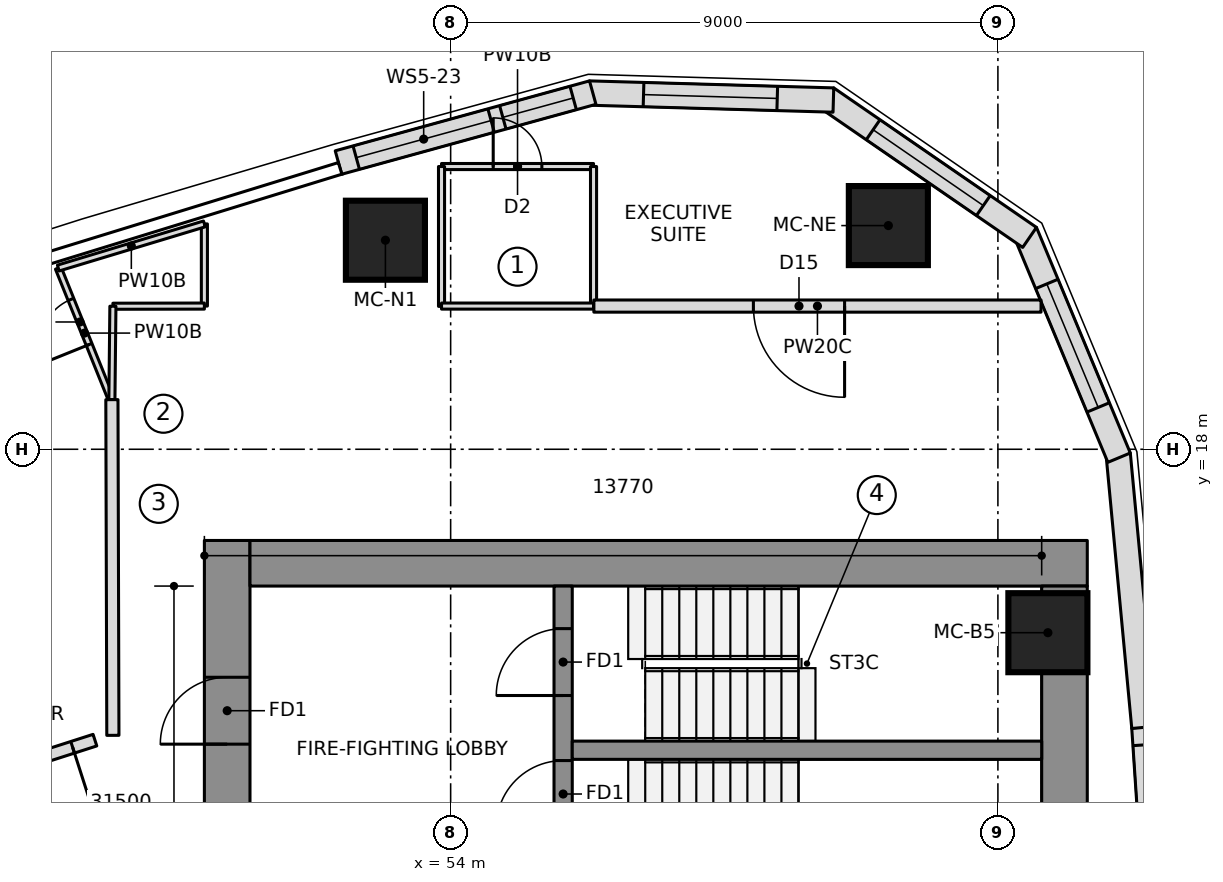
"""IFC4 building model, lengths in metres.
Left out: names, types, materials, properties, quantities, classifications, styles, units other than length and angle.
Written with IfcOpenShell. Run it as: python <this file> out.ifc"""

import sys

from ifc_helpers import new_model, si_unit, direction, frame, frame_2d, origin, origin_2d, place, context, subcontext, project, spatial, polyline, rectangle, outline, extrude, element, fill, save


model = new_model("IFC4")
c1 = context("Model", 3, precision=1e-05, world=origin(), true_north=direction((0.0, 1.0)))
c2 = subcontext(c1, "Body", "Model", "MODEL_VIEW")
j1 = project(units=[si_unit("LENGTHUNIT", "METRE"), si_unit("PLANEANGLEUNIT", "RADIAN")], contexts=[c1])
p1 = place(None, origin())
s1 = spatial("IfcSite", under=j1, at=p1, CompositionType="ELEMENT")
p2 = place(p1, origin())
s2 = spatial("IfcBuilding", under=s1, at=p2, CompositionType="ELEMENT")
p3 = place(p2, frame((0.0, 0.0, 196.8)))
s3 = spatial("IfcBuildingStorey", under=s2, at=p3, CompositionType="ELEMENT", Elevation=196.8)
p4 = place(p3, frame((50.325, 6.65, 0.0), z_axis=(0.0, 0.0, 1.0), x_axis=(0.0, 1.0, 0.0)))
e1 = element("IfcWall", 1, at=p4, inside=s3, PredefinedType="SHEAR", context=c2, shape_type="SweptSolid", body=[
    extrude(rectangle(XDim=9.85, YDim=0.75, at=frame_2d((4.925, 0.0))), origin(), (0.0, 0.0, 1.0), 3.55),
])
p5 = place(p4, frame((6.5, 0.0, 0.0)))
e2 = element("IfcOpeningElement", 2, at=p5, cuts=e1, PredefinedType="OPENING", context=c2, shape_type="SweptSolid", body=[
    extrude(rectangle(XDim=1.1, YDim=2.1, at=frame_2d((0.55, 1.05))), frame((0.0, 0.385, 0.0), z_axis=(0.0, -1.0, 0.0), x_axis=(1.0, 0.0, 0.0)), (0.0, 0.0, 1.0), 0.77),
])
p6 = place(p3, frame((50.7, 16.125, 0.0), z_axis=(0.0, 0.0, 1.0), x_axis=(1.0, 0.0, 0.0)))
e3 = element("IfcWall", 3, at=p6, inside=s3, PredefinedType="SHEAR", context=c2, shape_type="SweptSolid", body=[
    extrude(rectangle(XDim=13.77, YDim=0.75, at=frame_2d((6.885, 0.0))), origin(), (0.0, 0.0, 1.0), 3.55),
])
p7 = place(p3, frame((64.095, 8.099, 0.0), z_axis=(0.0, 0.0, 1.0), x_axis=(0.0, 1.0, 0.0)))
e4 = element("IfcWall", 4, at=p7, inside=s3, PredefinedType="SHEAR", context=c2, shape_type="SweptSolid", body=[
    extrude(rectangle(XDim=7.651, YDim=0.75, at=frame_2d((3.825, 0.0))), origin(), (0.0, 0.0, 1.0), 3.55),
])
p8 = place(p3, frame((55.85, 10.35, 0.0), z_axis=(0.0, 0.0, 1.0), x_axis=(0.0, 1.0, 0.0)))
e5 = element("IfcWall", 5, at=p8, inside=s3, PredefinedType="SHEAR", context=c2, shape_type="SweptSolid", body=[
    extrude(rectangle(XDim=5.4, YDim=0.3, at=frame_2d((2.7, 0.0))), origin(), (0.0, 0.0, 1.0), 3.55),
])
p9 = place(p8, frame((1.43, 0.0, 0.0)))
e6 = element("IfcOpeningElement", 6, at=p9, cuts=e5, PredefinedType="OPENING", context=c2, shape_type="SweptSolid", body=[
    extrude(rectangle(XDim=1.1, YDim=2.1, at=frame_2d((0.55, 1.05))), frame((0.0, 0.16, 0.0), z_axis=(0.0, -1.0, 0.0), x_axis=(1.0, 0.0, 0.0)), (0.0, 0.0, 1.0), 0.32),
])
p10 = place(p8, frame((3.6, 0.0, 0.0)))
e7 = element("IfcOpeningElement", 7, at=p10, cuts=e5, PredefinedType="OPENING", context=c2, shape_type="SweptSolid", body=[
    extrude(rectangle(XDim=1.1, YDim=2.1, at=frame_2d((0.55, 1.05))), frame((0.0, 0.16, 0.0), z_axis=(0.0, -1.0, 0.0), x_axis=(1.0, 0.0, 0.0)), (0.0, 0.0, 1.0), 0.32),
])
p11 = place(p3, frame((56.0, 13.05, 0.0), z_axis=(0.0, 0.0, 1.0), x_axis=(1.0, 0.0, 0.0)))
e8 = element("IfcWall", 8, at=p11, inside=s3, PredefinedType="SHEAR", context=c2, shape_type="SweptSolid", body=[
    extrude(rectangle(XDim=7.72, YDim=0.3, at=frame_2d((3.86, 0.0))), origin(), (0.0, 0.0, 1.0), 3.55),
])
for number, where, z_axis, x_axis in (
    (9, (63.822, 14.983, 0.0), (0.0, 0.0, 1.0), (1.0, 0.0, 0.0)),
    (10, (61.198, 21.679, 0.0), (0.0, 0.0, 1.0), (1.0, 0.0, 0.0)),
    (11, (52.927, 21.438, 0.0), (0.0, 0.0, 1.0), (1.0, 0.0, 0.0)),
):
    element("IfcColumn", number, at=place(p3, frame(where, z_axis=z_axis, x_axis=x_axis)), inside=s3, PredefinedType="COLUMN", context=c2, shape_type="SweptSolid", body=[
        extrude(rectangle(XDim=1.3, YDim=1.3, at=origin_2d()), origin(), (0.0, 0.0, 1.0), 3.55),
    ])
p12 = place(p3, frame((65.7, 8.958, 0.0), z_axis=(0.0, 0.0, 1.0), x_axis=(-0.066905935948, 0.997759287471, 0.0)))
e12 = element("IfcWall", 12, at=p12, inside=s3, PredefinedType="NOTDEFINED", context=c2, shape_type="SweptSolid", body=[
    extrude(outline(polyline([(-0.003, -0.2), (4.484, -0.2), (4.478, 0.2), (0.003, 0.2), (-0.003, -0.2)])), origin(), (0.0, 0.0, 1.0), 3.25),
])
p13 = place(p12, frame((0.29, 0.0, 0.9)))
e13 = element("IfcOpeningElement", 13, at=p13, cuts=e12, PredefinedType="OPENING", context=c2, shape_type="SweptSolid", body=[
    extrude(rectangle(XDim=3.9, YDim=1.8, at=frame_2d((1.95, 0.9))), frame((0.0, 0.21, 0.0), z_axis=(0.0, -1.0, 0.0), x_axis=(1.0, 0.0, 0.0)), (0.0, 0.0, 1.0), 0.42),
])
p14 = place(p3, frame((65.401, 13.429, 0.0), z_axis=(0.0, 0.0, 1.0), x_axis=(-0.093605694738, 0.995609348044, 0.0)))
e14 = element("IfcWall", 14, at=p14, inside=s3, PredefinedType="NOTDEFINED", context=c2, shape_type="SweptSolid", body=[
    extrude(outline(polyline([(-0.003, -0.2), (4.511, -0.2), (4.451, 0.2), (0.003, 0.2), (-0.003, -0.2)])), origin(), (0.0, 0.0, 1.0), 3.25),
])
p15 = place(p3, frame((64.981, 17.89, 0.0), z_axis=(0.0, 0.0, 1.0), x_axis=(-0.383997619794, 0.923334082547, 0.0)))
e15 = element("IfcWall", 15, at=p15, inside=s3, PredefinedType="NOTDEFINED", context=c2, shape_type="SweptSolid", body=[
    extrude(outline(polyline([(-0.03, -0.2), (3.988, -0.2), (3.87, 0.2), (0.03, 0.2), (-0.03, -0.2)])), origin(), (0.0, 0.0, 1.0), 3.25),
])
p16 = place(p15, frame((0.865, 0.0, 0.6)))
e16 = element("IfcOpeningElement", 16, at=p16, cuts=e15, PredefinedType="OPENING", context=c2, shape_type="SweptSolid", body=[
    extrude(outline(polyline([(0.0, 1.35), (0.084, 1.771), (0.322, 2.128), (0.679, 2.366), (1.1, 2.45), (1.521, 2.366), (1.878, 2.128), (2.116, 1.771), (2.2, 1.35), (2.2, 1.1), (2.116, 0.679), (1.878, 0.322), (1.521, 0.084), (1.1, 0.0), (0.679, 0.084), (0.322, 0.322), (0.084, 0.679), (0.0, 1.1), (0.0, 1.35)])), frame((0.0, 0.21, 0.0), z_axis=(0.0, -1.0, 0.0), x_axis=(1.0, 0.0, 0.0)), (0.0, 0.0, 1.0), 0.42),
])
p17 = place(p3, frame((63.472, 21.518, 0.0), z_axis=(0.0, 0.0, 1.0), x_axis=(-0.823806162588, 0.566871596115, 0.0)))
e17 = element("IfcWall", 17, at=p17, inside=s3, PredefinedType="NOTDEFINED", context=c2, shape_type="SweptSolid", body=[
    extrude(outline(polyline([(-0.059, -0.2), (3.988, -0.2), (3.87, 0.2), (0.059, 0.2), (-0.059, -0.2)])), origin(), (0.0, 0.0, 1.0), 3.25),
])
p18 = place(p17, frame((0.865, 0.0, 0.6)))
e18 = element("IfcOpeningElement", 18, at=p18, cuts=e17, PredefinedType="OPENING", context=c2, shape_type="SweptSolid", body=[
    extrude(outline(polyline([(0.0, 1.35), (0.084, 1.771), (0.322, 2.128), (0.679, 2.366), (1.1, 2.45), (1.521, 2.366), (1.878, 2.128), (2.116, 1.771), (2.2, 1.35), (2.2, 1.1), (2.116, 0.679), (1.878, 0.322), (1.521, 0.084), (1.1, 0.0), (0.679, 0.084), (0.322, 0.322), (0.084, 0.679), (0.0, 1.1), (0.0, 1.35)])), frame((0.0, 0.21, 0.0), z_axis=(0.0, -1.0, 0.0), x_axis=(1.0, 0.0, 0.0)), (0.0, 0.0, 1.0), 0.42),
])
p19 = place(p3, frame((60.236, 23.745, 0.0), z_axis=(0.0, 0.0, 1.0), x_axis=(-0.999587920197, 0.028705222472, 0.0)))
e19 = element("IfcWall", 19, at=p19, inside=s3, PredefinedType="NOTDEFINED", context=c2, shape_type="SweptSolid", body=[
    extrude(outline(polyline([(-0.059, -0.2), (3.959, -0.2), (3.9, 0.2), (0.059, 0.2), (-0.059, -0.2)])), origin(), (0.0, 0.0, 1.0), 3.25),
])
p20 = place(p19, frame((0.865, 0.0, 0.6)))
e20 = element("IfcOpeningElement", 20, at=p20, cuts=e19, PredefinedType="OPENING", context=c2, shape_type="SweptSolid", body=[
    extrude(outline(polyline([(0.0, 1.35), (0.084, 1.771), (0.322, 2.128), (0.679, 2.366), (1.1, 2.45), (1.521, 2.366), (1.878, 2.128), (2.116, 1.771), (2.2, 1.35), (2.2, 1.1), (2.116, 0.679), (1.878, 0.322), (1.521, 0.084), (1.1, 0.0), (0.679, 0.084), (0.322, 0.322), (0.084, 0.679), (0.0, 1.1), (0.0, 1.35)])), frame((0.0, 0.21, 0.0), z_axis=(0.0, -1.0, 0.0), x_axis=(1.0, 0.0, 0.0)), (0.0, 0.0, 1.0), 0.42),
])
p21 = place(p3, frame((56.308, 23.858, 0.0), z_axis=(0.0, 0.0, 1.0), x_axis=(-0.964205755089, -0.265155165617, 0.0)))
e21 = element("IfcWall", 21, at=p21, inside=s3, PredefinedType="NOTDEFINED", context=c2, shape_type="SweptSolid", body=[
    extrude(outline(polyline([(-0.03, -0.2), (4.307, -0.2), (4.307, 0.2), (0.03, 0.2), (-0.03, -0.2)])), origin(), (0.0, 0.0, 1.0), 3.25),
])
p22 = place(p21, frame((0.303, 0.0, 0.9)))
e22 = element("IfcOpeningElement", 22, at=p22, cuts=e21, PredefinedType="OPENING", context=c2, shape_type="SweptSolid", body=[
    extrude(rectangle(XDim=1.2, YDim=1.8, at=frame_2d((0.6, 0.9))), frame((0.0, 0.21, 0.0), z_axis=(0.0, -1.0, 0.0), x_axis=(1.0, 0.0, 0.0)), (0.0, 0.0, 1.0), 0.42),
])
p23 = place(p21, frame((1.704, 0.0, 0.9)))
e23 = element("IfcOpeningElement", 23, at=p23, cuts=e21, PredefinedType="OPENING", context=c2, shape_type="SweptSolid", body=[
    extrude(rectangle(XDim=2.3, YDim=1.8, at=frame_2d((1.15, 0.9))), frame((0.0, 0.21, 0.0), z_axis=(0.0, -1.0, 0.0), x_axis=(1.0, 0.0, 0.0)), (0.0, 0.0, 1.0), 0.42),
])
p24 = place(p3, frame((53.85, 22.65, 0.0), z_axis=(0.0, 0.0, 1.0), x_axis=(1.0, 0.0, 0.0)))
e24 = element("IfcWall", 24, at=p24, inside=s3, PredefinedType="PARTITIONING", context=c2, shape_type="SweptSolid", body=[
    extrude(rectangle(XDim=2.5, YDim=0.1, at=frame_2d((1.25, 0.0))), origin(), (0.0, 0.0, 1.0), 3.25),
])
p25 = place(p24, frame((0.85, 0.0, 0.0)))
e25 = element("IfcOpeningElement", 25, at=p25, cuts=e24, PredefinedType="OPENING", context=c2, shape_type="SweptSolid", body=[
    extrude(rectangle(XDim=0.8, YDim=2.1, at=frame_2d((0.4, 1.05))), frame((0.0, 0.06, 0.0), z_axis=(0.0, -1.0, 0.0), x_axis=(1.0, 0.0, 0.0)), (0.0, 0.0, 1.0), 0.12),
])
for number, where, z_axis, x_axis in (
    (26, (56.35, 22.65, 0.0), (0.0, 0.0, 1.0), (0.0, -1.0, 0.0)),
    (27, (53.85, 20.35, 0.0), (0.0, 0.0, 1.0), (0.0, 1.0, 0.0)),
):
    element("IfcWall", number, at=place(p3, frame(where, z_axis=z_axis, x_axis=x_axis)), inside=s3, PredefinedType="PARTITIONING", context=c2, shape_type="SweptSolid", body=[
        extrude(rectangle(XDim=2.3, YDim=0.1, at=frame_2d((1.15, 0.0))), origin(), (0.0, 0.0, 1.0), 3.25),
    ])
p26 = place(p3, frame((48.409, 18.841, 0.0), z_axis=(0.0, 0.0, 1.0), x_axis=(-0.373908119057, 0.927465750582, 0.0)))
e28 = element("IfcWall", 28, at=p26, inside=s3, PredefinedType="PARTITIONING", context=c2, shape_type="SweptSolid", body=[
    extrude(rectangle(XDim=2.306, YDim=0.1, at=frame_2d((1.153, 0.0))), origin(), (0.0, 0.0, 1.0), 3.25),
])
p27 = place(p26, frame((0.95, 0.0, 0.0)))
e29 = element("IfcOpeningElement", 29, at=p27, cuts=e28, PredefinedType="OPENING", context=c2, shape_type="SweptSolid", body=[
    extrude(rectangle(XDim=0.8, YDim=2.1, at=frame_2d((0.4, 1.05))), frame((0.0, 0.06, 0.0), z_axis=(0.0, -1.0, 0.0), x_axis=(1.0, 0.0, 0.0)), (0.0, 0.0, 1.0), 0.12),
])
p28 = place(p3, frame((63.709, 20.355, 0.0), z_axis=(0.0, 0.0, 1.0), x_axis=(-1.0, 0.0, 0.0)))
e30 = element("IfcWall", 30, at=p28, inside=s3, PredefinedType="PARTITIONING", context=c2, shape_type="SweptSolid", body=[
    extrude(rectangle(XDim=7.354, YDim=0.2, at=frame_2d((3.677, 0.0))), origin(), (0.0, 0.0, 1.0), 3.25),
])
p29 = place(p28, frame((3.231, 0.0, 0.0)))
e31 = element("IfcOpeningElement", 31, at=p29, cuts=e30, PredefinedType="OPENING", context=c2, shape_type="SweptSolid", body=[
    extrude(rectangle(XDim=1.5, YDim=2.1, at=frame_2d((0.75, 1.05))), frame((0.0, 0.11, 0.0), z_axis=(0.0, -1.0, 0.0), x_axis=(1.0, 0.0, 0.0)), (0.0, 0.0, 1.0), 0.22),
])
p30 = place(p3, frame((56.35, 20.355, 0.0), z_axis=(0.0, 0.0, 1.0), x_axis=(-1.0, 0.0, 0.0)))
e32 = element("IfcWall", 32, at=p30, inside=s3, PredefinedType="PARTITIONING", context=c2, shape_type="SweptSolid", body=[
    extrude(rectangle(XDim=2.5, YDim=0.1, at=frame_2d((1.25, 0.0))), origin(), (0.0, 0.0, 1.0), 3.25),
])
p31 = place(p3, frame((49.95, 21.706, 0.0), z_axis=(0.0, 0.0, 1.0), x_axis=(0.0, -1.0, 0.0)))
e33 = element("IfcWall", 33, at=p31, inside=s3, PredefinedType="PARTITIONING", context=c2, shape_type="SweptSolid", body=[
    extrude(rectangle(XDim=1.351, YDim=0.1, at=frame_2d((0.676, 0.0))), origin(), (0.0, 0.0, 1.0), 3.25),
])
p32 = place(p3, frame((49.95, 20.355, 0.0), z_axis=(0.0, 0.0, 1.0), x_axis=(-0.999998406651, -0.001785131852, 0.0)))
e34 = element("IfcWall", 34, at=p32, inside=s3, PredefinedType="PARTITIONING", context=c2, shape_type="SweptSolid", body=[
    extrude(rectangle(XDim=1.504, YDim=0.1, at=frame_2d((0.752, 0.0))), origin(), (0.0, 0.0, 1.0), 3.25),
])
p33 = place(p3, frame((48.446, 20.352, 0.0), z_axis=(0.0, 0.0, 1.0), x_axis=(-0.010805026288, -0.999941624, 0.0)))
e35 = element("IfcWall", 35, at=p33, inside=s3, PredefinedType="PARTITIONING", context=c2, shape_type="SweptSolid", body=[
    extrude(rectangle(XDim=1.536, YDim=0.1, at=frame_2d((0.768, 0.0))), origin(), (0.0, 0.0, 1.0), 3.25),
])
p34 = place(p3, frame((47.547, 20.98, 0.0), z_axis=(0.0, 0.0, 1.0), x_axis=(0.957251518155, 0.289256859885, 0.0)))
e36 = element("IfcWall", 36, at=p34, inside=s3, PredefinedType="PARTITIONING", context=c2, shape_type="SweptSolid", body=[
    extrude(rectangle(XDim=2.51, YDim=0.1, at=frame_2d((1.255, 0.0))), origin(), (0.0, 0.0, 1.0), 3.25),
])
p35 = place(p3, frame((48.15, 13.216, 0.0), z_axis=(0.0, 0.0, 1.0), x_axis=(-0.952101841283, -0.305781104428, 0.0)))
e37 = element("IfcWall", 37, at=p35, inside=s3, PredefinedType="PARTITIONING", context=c2, shape_type="SweptSolid", body=[
    extrude(rectangle(XDim=2.079, YDim=0.2, at=frame_2d((1.04, 0.0))), origin(), (0.0, 0.0, 1.0), 3.25),
])
p36 = place(p35, frame((0.385, 0.0, 0.0)))
e38 = element("IfcOpeningElement", 38, at=p36, cuts=e37, PredefinedType="OPENING", context=c2, shape_type="SweptSolid", body=[
    extrude(rectangle(XDim=1.0, YDim=2.1, at=frame_2d((0.5, 1.05))), frame((0.0, 0.11, 0.0), z_axis=(0.0, -1.0, 0.0), x_axis=(1.0, 0.0, 0.0)), (0.0, 0.0, 1.0), 0.22),
])
p37 = place(p3, frame((48.429, 18.816, 0.0), z_axis=(0.0, 0.0, 1.0), x_axis=(0.002918533604, -0.999995741072, 0.0)))
e39 = element("IfcWall", 39, at=p37, inside=s3, PredefinedType="PARTITIONING", context=c2, shape_type="SweptSolid", body=[
    extrude(rectangle(XDim=5.521, YDim=0.2, at=frame_2d((2.76, 0.0))), origin(), (0.0, 0.0, 1.0), 3.25),
])
p38 = place(p13, origin())
e40 = element("IfcWindow", 40, at=p38, inside=s3, PartitioningType="SINGLE_PANEL", PredefinedType="WINDOW", context=c2, shape_type="SweptSolid", body=[
    extrude(rectangle(XDim=3.9, YDim=1.8, at=frame_2d((1.95, 0.9))), frame((0.0, 0.17, 0.0), z_axis=(0.0, -1.0, 0.0), x_axis=(1.0, 0.0, 0.0)), (0.0, 0.0, 1.0), 0.06),
])
fill(e13, e40)
p39 = place(p16, origin())
e41 = element("IfcWindow", 41, at=p39, inside=s3, PartitioningType="SINGLE_PANEL", PredefinedType="WINDOW", context=c2, shape_type="SweptSolid", body=[
    extrude(outline(polyline([(0.0, 1.35), (0.084, 1.771), (0.322, 2.128), (0.679, 2.366), (1.1, 2.45), (1.521, 2.366), (1.878, 2.128), (2.116, 1.771), (2.2, 1.35), (2.2, 1.1), (2.116, 0.679), (1.878, 0.322), (1.521, 0.084), (1.1, 0.0), (0.679, 0.084), (0.322, 0.322), (0.084, 0.679), (0.0, 1.1), (0.0, 1.35)])), frame((0.0, 0.17, 0.0), z_axis=(0.0, -1.0, 0.0), x_axis=(1.0, 0.0, 0.0)), (0.0, 0.0, 1.0), 0.06),
])
fill(e16, e41)
p40 = place(p18, origin())
e42 = element("IfcWindow", 42, at=p40, inside=s3, PartitioningType="SINGLE_PANEL", PredefinedType="WINDOW", context=c2, shape_type="SweptSolid", body=[
    extrude(outline(polyline([(0.0, 1.35), (0.084, 1.771), (0.322, 2.128), (0.679, 2.366), (1.1, 2.45), (1.521, 2.366), (1.878, 2.128), (2.116, 1.771), (2.2, 1.35), (2.2, 1.1), (2.116, 0.679), (1.878, 0.322), (1.521, 0.084), (1.1, 0.0), (0.679, 0.084), (0.322, 0.322), (0.084, 0.679), (0.0, 1.1), (0.0, 1.35)])), frame((0.0, 0.17, 0.0), z_axis=(0.0, -1.0, 0.0), x_axis=(1.0, 0.0, 0.0)), (0.0, 0.0, 1.0), 0.06),
])
fill(e18, e42)
p41 = place(p20, origin())
e43 = element("IfcWindow", 43, at=p41, inside=s3, PartitioningType="SINGLE_PANEL", PredefinedType="WINDOW", context=c2, shape_type="SweptSolid", body=[
    extrude(outline(polyline([(0.0, 1.35), (0.084, 1.771), (0.322, 2.128), (0.679, 2.366), (1.1, 2.45), (1.521, 2.366), (1.878, 2.128), (2.116, 1.771), (2.2, 1.35), (2.2, 1.1), (2.116, 0.679), (1.878, 0.322), (1.521, 0.084), (1.1, 0.0), (0.679, 0.084), (0.322, 0.322), (0.084, 0.679), (0.0, 1.1), (0.0, 1.35)])), frame((0.0, 0.17, 0.0), z_axis=(0.0, -1.0, 0.0), x_axis=(1.0, 0.0, 0.0)), (0.0, 0.0, 1.0), 0.06),
])
fill(e20, e43)
p42 = place(p22, origin())
e44 = element("IfcWindow", 44, at=p42, inside=s3, PartitioningType="SINGLE_PANEL", PredefinedType="WINDOW", context=c2, shape_type="SweptSolid", body=[
    extrude(rectangle(XDim=1.2, YDim=1.8, at=frame_2d((0.6, 0.9))), frame((0.0, 0.17, 0.0), z_axis=(0.0, -1.0, 0.0), x_axis=(1.0, 0.0, 0.0)), (0.0, 0.0, 1.0), 0.06),
])
fill(e22, e44)
p43 = place(p23, origin())
e45 = element("IfcWindow", 45, at=p43, inside=s3, PartitioningType="SINGLE_PANEL", PredefinedType="WINDOW", context=c2, shape_type="SweptSolid", body=[
    extrude(rectangle(XDim=2.3, YDim=1.8, at=frame_2d((1.15, 0.9))), frame((0.0, 0.17, 0.0), z_axis=(0.0, -1.0, 0.0), x_axis=(1.0, 0.0, 0.0)), (0.0, 0.0, 1.0), 0.06),
])
fill(e23, e45)
p44 = place(p25, origin())
e46 = element("IfcDoor", 46, at=p44, inside=s3, OperationType="SINGLE_SWING_LEFT", PredefinedType="DOOR", context=c2, shape_type="SweptSolid", body=[
    extrude(rectangle(XDim=0.8, YDim=2.1, at=frame_2d((0.4, 1.05))), frame((0.0, 0.025, 0.0), z_axis=(0.0, -1.0, 0.0), x_axis=(1.0, 0.0, 0.0)), (0.0, 0.0, 1.0), 0.05),
])
fill(e25, e46)
p45 = place(p27, origin())
e47 = element("IfcDoor", 47, at=p45, inside=s3, OperationType="SINGLE_SWING_LEFT", PredefinedType="DOOR", context=c2, shape_type="SweptSolid", body=[
    extrude(rectangle(XDim=0.8, YDim=2.1, at=frame_2d((0.4, 1.05))), frame((0.0, 0.025, 0.0), z_axis=(0.0, -1.0, 0.0), x_axis=(1.0, 0.0, 0.0)), (0.0, 0.0, 1.0), 0.05),
])
fill(e29, e47)
p46 = place(p36, origin())
e48 = element("IfcDoor", 48, at=p46, inside=s3, OperationType="SINGLE_SWING_RIGHT", PredefinedType="DOOR", context=c2, shape_type="SweptSolid", body=[
    extrude(rectangle(XDim=1.0, YDim=2.1, at=frame_2d((0.5, 1.05))), frame((0.0, 0.025, 0.0), z_axis=(0.0, -1.0, 0.0), x_axis=(1.0, 0.0, 0.0)), (0.0, 0.0, 1.0), 0.05),
])
fill(e38, e48)
p47 = place(p29, origin())
e49 = element("IfcDoor", 49, at=p47, inside=s3, OperationType="DOUBLE_DOOR_SINGLE_SWING", PredefinedType="DOOR", context=c2, shape_type="SweptSolid", body=[
    extrude(rectangle(XDim=1.5, YDim=2.1, at=frame_2d((0.75, 1.05))), frame((0.0, 0.025, 0.0), z_axis=(0.0, -1.0, 0.0), x_axis=(1.0, 0.0, 0.0)), (0.0, 0.0, 1.0), 0.05),
])
fill(e31, e49)
p48 = place(p9, origin())
e50 = element("IfcDoor", 50, at=p48, inside=s3, OperationType="SINGLE_SWING_RIGHT", PredefinedType="DOOR", context=c2, shape_type="SweptSolid", body=[
    extrude(rectangle(XDim=1.1, YDim=2.1, at=frame_2d((0.55, 1.05))), frame((0.0, 0.025, 0.0), z_axis=(0.0, -1.0, 0.0), x_axis=(1.0, 0.0, 0.0)), (0.0, 0.0, 1.0), 0.05),
])
fill(e6, e50)
p49 = place(p10, origin())
e51 = element("IfcDoor", 51, at=p49, inside=s3, OperationType="SINGLE_SWING_RIGHT", PredefinedType="DOOR", context=c2, shape_type="SweptSolid", body=[
    extrude(rectangle(XDim=1.1, YDim=2.1, at=frame_2d((0.55, 1.05))), frame((0.0, 0.025, 0.0), z_axis=(0.0, -1.0, 0.0), x_axis=(1.0, 0.0, 0.0)), (0.0, 0.0, 1.0), 0.05),
])
fill(e7, e51)
p50 = place(p5, origin())
e52 = element("IfcDoor", 52, at=p50, inside=s3, OperationType="SINGLE_SWING_RIGHT", PredefinedType="DOOR", context=c2, shape_type="SweptSolid", body=[
    extrude(rectangle(XDim=1.1, YDim=2.1, at=frame_2d((0.55, 1.05))), frame((0.0, 0.025, 0.0), z_axis=(0.0, -1.0, 0.0), x_axis=(1.0, 0.0, 0.0)), (0.0, 0.0, 1.0), 0.05),
])
fill(e2, e52)
save(model, sys.argv[1])
